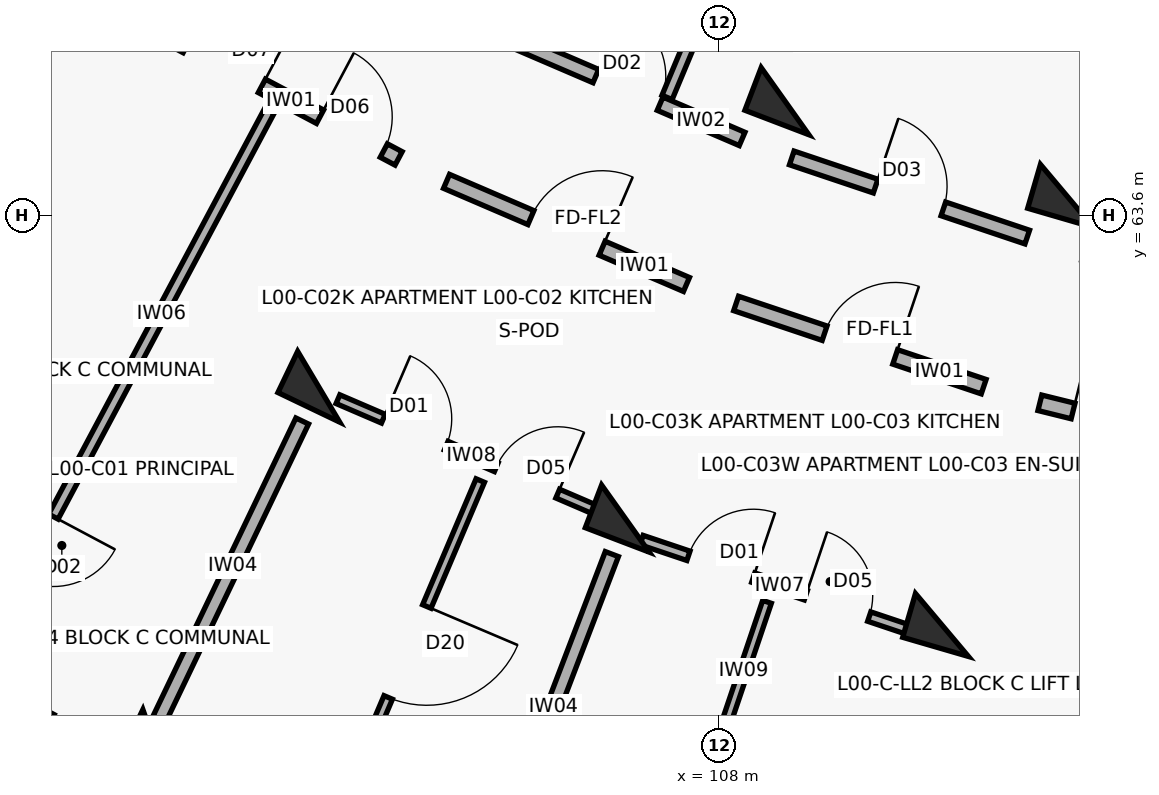
"""IFC4 building model, lengths in metres.
Left out: names, types, materials, properties, quantities, classifications, styles, units other than length and angle.
Written with IfcOpenShell. Run it as: python <this file> out.ifc"""

import sys

from ifc_helpers import new_model, si_unit, direction, frame, frame_2d, origin, origin_2d, place, context, subcontext, project, spatial, rectangle, extrude, element, fill, save


model = new_model("IFC4")
c1 = context("Model", 3, precision=1e-05, world=origin(), true_north=direction((0.0, 1.0)))
c2 = subcontext(c1, "Body", "Model", "MODEL_VIEW")
j1 = project(units=[si_unit("LENGTHUNIT", "METRE"), si_unit("PLANEANGLEUNIT", "RADIAN")], contexts=[c1])
p1 = place(None, origin())
s1 = spatial("IfcSite", under=j1, at=p1, CompositionType="ELEMENT")
p2 = place(p1, origin())
s2 = spatial("IfcBuilding", under=s1, at=p2, CompositionType="ELEMENT")
p3 = place(p2, origin())
s3 = spatial("IfcBuildingStorey", under=s2, at=p3, CompositionType="ELEMENT", Elevation=0.0)
for number, where, z_axis, x_axis in (
    (1, (98.853, 63.4, 0.0), (0.0, 0.0, 1.0), (-0.504, -0.864, 0.0)),
    (2, (102.734, 61.341, 0.0), (0.0, 0.0, 1.0), (-0.432, -0.902, 0.0)),
):
    element("IfcColumn", number, at=place(p3, frame(where, z_axis=z_axis, x_axis=x_axis)), inside=s3, PredefinedType="COLUMN", context=c2, shape_type="SweptSolid", body=[
        extrude(rectangle(XDim=0.6, YDim=0.9, at=origin_2d()), origin(), (0.0, 0.0, 1.0), 4.5),
    ])
p4 = place(p3, frame((100.539, 56.76, 0.0), z_axis=(0.0, 0.0, 1.0), x_axis=(-0.432085748802, -0.901832526405, 0.0)))
e3 = element("IfcColumn", 3, at=p4, inside=s3, PredefinedType="COLUMN", context=c2, shape_type="SweptSolid", body=[
    extrude(rectangle(XDim=0.5, YDim=0.5, at=origin_2d()), origin(), (0.0, 0.0, 1.0), 4.5),
])
for number, where, z_axis, x_axis in (
    (4, (108.869, 65.099, 0.0), (0.0, 0.0, 1.0), (-0.357, -0.934, 0.0)),
    (5, (106.77, 59.606, 0.0), (0.0, 0.0, 1.0), (-0.357, -0.934, 0.0)),
    (6, (112.579, 63.852, 0.0), (0.0, 0.0, 1.0), (-0.28, -0.96, 0.0)),
    (7, (110.934, 58.207, 0.0), (0.0, 0.0, 1.0), (-0.28, -0.96, 0.0)),
):
    element("IfcColumn", number, at=place(p3, frame(where, z_axis=z_axis, x_axis=x_axis)), inside=s3, PredefinedType="COLUMN", context=c2, shape_type="SweptSolid", body=[
        extrude(rectangle(XDim=0.6, YDim=0.9, at=origin_2d()), origin(), (0.0, 0.0, 1.0), 4.5),
    ])
p5 = place(p3, frame((96.057, 58.572, 0.0), z_axis=(0.0, 0.0, 1.0), x_axis=(0.883448093208, -0.468529045639, 0.0)))
e8 = element("IfcWall", 8, at=p5, inside=s3, PredefinedType="SOLIDWALL", context=c2, shape_type="SweptSolid", body=[
    extrude(rectangle(XDim=4.809, YDim=0.268, at=frame_2d((2.405, 0.0))), origin(), (0.0, 0.0, 1.0), 3.45),
])
p6 = place(p5, frame((0.3, 0.0, 0.3)))
e9 = element("IfcOpeningElement", 9, at=p6, cuts=e8, PredefinedType="OPENING", context=c2, shape_type="SweptSolid", body=[
    extrude(rectangle(XDim=0.96, YDim=1.42, at=frame_2d((0.48, 0.71))), frame((0.0, 0.144, 0.0), z_axis=(0.0, -1.0, 0.0), x_axis=(1.0, 0.0, 0.0)), (0.0, 0.0, 1.0), 0.288),
])
p7 = place(p5, frame((3.549, 0.0, 0.3)))
e10 = element("IfcOpeningElement", 10, at=p7, cuts=e8, PredefinedType="OPENING", context=c2, shape_type="SweptSolid", body=[
    extrude(rectangle(XDim=0.96, YDim=1.42, at=frame_2d((0.48, 0.71))), frame((0.0, 0.144, 0.0), z_axis=(0.0, -1.0, 0.0), x_axis=(1.0, 0.0, 0.0)), (0.0, 0.0, 1.0), 0.288),
])
p8 = place(p3, frame((100.75, 65.956, 0.0), z_axis=(0.0, 0.0, 1.0), x_axis=(0.883440266101, -0.468543803963, 0.0)))
e11 = element("IfcWall", 11, at=p8, inside=s3, PredefinedType="SOLIDWALL", context=c2, shape_type="SweptSolid", body=[
    extrude(rectangle(XDim=3.436, YDim=0.2, at=frame_2d((1.718, 0.0))), origin(), (0.0, 0.0, 1.0), 3.34),
])
p9 = place(p8, frame((0.28, 0.0, 0.0)))
e12 = element("IfcOpeningElement", 12, at=p9, cuts=e11, PredefinedType="OPENING", context=c2, shape_type="SweptSolid", body=[
    extrude(rectangle(XDim=1.12, YDim=2.15, at=frame_2d((0.56, 1.075))), frame((0.0, 0.11, 0.0), z_axis=(0.0, -1.0, 0.0), x_axis=(1.0, 0.0, 0.0)), (0.0, 0.0, 1.0), 0.22),
])
p10 = place(p8, frame((2.266, 0.0, 0.0)))
e13 = element("IfcOpeningElement", 13, at=p10, cuts=e11, PredefinedType="OPENING", context=c2, shape_type="SweptSolid", body=[
    extrude(rectangle(XDim=0.95, YDim=2.1, at=frame_2d((0.475, 1.05))), frame((0.0, 0.11, 0.0), z_axis=(0.0, -1.0, 0.0), x_axis=(1.0, 0.0, 0.0)), (0.0, 0.0, 1.0), 0.22),
])
p11 = place(p3, frame((102.087, 64.973, 0.0), z_axis=(0.0, 0.0, 1.0), x_axis=(-0.469878800394, -0.882730940287, 0.0)))
e14 = element("IfcWall", 14, at=p11, inside=s3, PredefinedType="PARTITIONING", context=c2, shape_type="SweptSolid", body=[
    extrude(rectangle(XDim=7.95, YDim=0.14, at=frame_2d((3.975, 0.0))), origin(), (0.0, 0.0, 1.0), 3.34),
])
p12 = place(p11, frame((6.05, 0.0, 0.0)))
e15 = element("IfcOpeningElement", 15, at=p12, cuts=e14, PredefinedType="OPENING", context=c2, shape_type="SweptSolid", body=[
    extrude(rectangle(XDim=0.92, YDim=2.1, at=frame_2d((0.46, 1.05))), frame((0.0, 0.08, 0.0), z_axis=(0.0, -1.0, 0.0), x_axis=(1.0, 0.0, 0.0)), (0.0, 0.0, 1.0), 0.16),
])
p13 = place(p3, frame((104.417, 64.044, 0.0), z_axis=(0.0, 0.0, 1.0), x_axis=(0.918718172399, -0.394913813008, 0.0)))
e16 = element("IfcWall", 16, at=p13, inside=s3, PredefinedType="SOLIDWALL", context=c2, shape_type="SweptSolid", body=[
    extrude(rectangle(XDim=3.436, YDim=0.2, at=frame_2d((1.718, 0.0))), origin(), (0.0, 0.0, 1.0), 3.34),
])
p14 = place(p13, frame((1.208, 0.0, 0.0)))
e17 = element("IfcOpeningElement", 17, at=p14, cuts=e16, PredefinedType="OPENING", context=c2, shape_type="SweptSolid", body=[
    extrude(rectangle(XDim=1.02, YDim=2.15, at=frame_2d((0.51, 1.075))), frame((0.0, 0.11, 0.0), z_axis=(0.0, -1.0, 0.0), x_axis=(1.0, 0.0, 0.0)), (0.0, 0.0, 1.0), 0.22),
])
p15 = place(p3, frame((105.302, 65.893, 0.0), z_axis=(0.0, 0.0, 1.0), x_axis=(0.918723391052, -0.394901672235, 0.0)))
e18 = element("IfcWall", 18, at=p15, inside=s3, PredefinedType="SOLIDWALL", context=c2, shape_type="SweptSolid", body=[
    extrude(rectangle(XDim=3.269, YDim=0.19, at=frame_2d((1.634, 0.0))), origin(), (0.0, 0.0, 1.0), 3.34),
])
p16 = place(p15, frame((1.174, 0.0, 0.0)))
e19 = element("IfcOpeningElement", 19, at=p16, cuts=e18, PredefinedType="OPENING", context=c2, shape_type="SweptSolid", body=[
    extrude(rectangle(XDim=0.92, YDim=2.1, at=frame_2d((0.46, 1.05))), frame((0.0, 0.105, 0.0), z_axis=(0.0, -1.0, 0.0), x_axis=(1.0, 0.0, 0.0)), (0.0, 0.0, 1.0), 0.21),
])
p17 = place(p3, frame((108.589, 68.194, 0.0), z_axis=(0.0, 0.0, 1.0), x_axis=(-0.385151143297, -0.922853507777, 0.0)))
e20 = element("IfcWall", 20, at=p17, inside=s3, PredefinedType="PARTITIONING", context=c2, shape_type="SweptSolid", body=[
    extrude(rectangle(XDim=3.3, YDim=0.145, at=frame_2d((1.65, 0.0))), origin(), (0.0, 0.0, 1.0), 3.34),
])
p18 = place(p17, frame((1.21, 0.0, 0.0)))
e21 = element("IfcOpeningElement", 21, at=p18, cuts=e20, PredefinedType="OPENING", context=c2, shape_type="SweptSolid", body=[
    extrude(rectangle(XDim=0.88, YDim=2.1, at=frame_2d((0.44, 1.05))), frame((0.0, 0.083, 0.0), z_axis=(0.0, -1.0, 0.0), x_axis=(1.0, 0.0, 0.0)), (0.0, 0.0, 1.0), 0.165),
])
p19 = place(p3, frame((102.988, 61.178, 0.0), z_axis=(0.0, 0.0, 1.0), x_axis=(0.918732171064, -0.394881245253, 0.0)))
e22 = element("IfcWall", 22, at=p19, inside=s3, PredefinedType="PARTITIONING", context=c2, shape_type="SweptSolid", body=[
    extrude(rectangle(XDim=3.797, YDim=0.125, at=frame_2d((1.899, 0.0))), origin(), (0.0, 0.0, 1.0), 3.34),
])
p20 = place(p19, frame((0.65, 0.0, 0.0)))
e23 = element("IfcOpeningElement", 23, at=p20, cuts=e22, PredefinedType="OPENING", context=c2, shape_type="SweptSolid", body=[
    extrude(rectangle(XDim=0.9, YDim=2.1, at=frame_2d((0.45, 1.05))), frame((0.0, 0.073, 0.0), z_axis=(0.0, -1.0, 0.0), x_axis=(1.0, 0.0, 0.0)), (0.0, 0.0, 1.0), 0.145),
])
p21 = place(p19, frame((2.267, 0.0, 0.0)))
e24 = element("IfcOpeningElement", 24, at=p21, cuts=e22, PredefinedType="OPENING", context=c2, shape_type="SweptSolid", body=[
    extrude(rectangle(XDim=0.88, YDim=2.1, at=frame_2d((0.44, 1.05))), frame((0.0, 0.073, 0.0), z_axis=(0.0, -1.0, 0.0), x_axis=(1.0, 0.0, 0.0)), (0.0, 0.0, 1.0), 0.145),
])
p22 = place(p3, frame((104.86, 60.107, 0.0), z_axis=(0.0, 0.0, 1.0), x_axis=(-0.390783996242, -0.920482410631, 0.0)))
e25 = element("IfcWall", 25, at=p22, inside=s3, PredefinedType="PARTITIONING", context=c2, shape_type="SweptSolid", body=[
    extrude(rectangle(XDim=4.9, YDim=0.12, at=frame_2d((2.45, 0.0))), origin(), (0.0, 0.0, 1.0), 3.34),
])
p23 = place(p22, frame((1.8, 0.0, 0.0)))
e26 = element("IfcOpeningElement", 26, at=p23, cuts=e25, PredefinedType="OPENING", context=c2, shape_type="SweptSolid", body=[
    extrude(rectangle(XDim=1.3, YDim=2.1, at=frame_2d((0.65, 1.05))), frame((0.0, 0.07, 0.0), z_axis=(0.0, -1.0, 0.0), x_axis=(1.0, 0.0, 0.0)), (0.0, 0.0, 1.0), 0.14),
])
p24 = place(p3, frame((102.518, 60.89, 0.0), z_axis=(0.0, 0.0, 1.0), x_axis=(-0.432108769108, -0.901821496561, 0.0)))
e27 = element("IfcWall", 27, at=p24, inside=s3, PredefinedType="SOLIDWALL", context=c2, shape_type="SweptSolid", body=[
    extrude(rectangle(XDim=4.35, YDim=0.185, at=frame_2d((2.175, 0.0))), origin(), (0.0, 0.0, 1.0), 3.34),
])
p25 = place(p3, frame((108.227, 62.437, 0.0), z_axis=(0.0, 0.0, 1.0), x_axis=(0.947884468821, -0.318614239745, 0.0)))
e28 = element("IfcWall", 28, at=p25, inside=s3, PredefinedType="SOLIDWALL", context=c2, shape_type="SweptSolid", body=[
    extrude(rectangle(XDim=3.436, YDim=0.2, at=frame_2d((1.718, 0.0))), origin(), (0.0, 0.0, 1.0), 3.34),
])
p26 = place(p25, frame((1.228, 0.0, 0.0)))
e29 = element("IfcOpeningElement", 29, at=p26, cuts=e28, PredefinedType="OPENING", context=c2, shape_type="SweptSolid", body=[
    extrude(rectangle(XDim=0.98, YDim=2.15, at=frame_2d((0.49, 1.075))), frame((0.0, 0.11, 0.0), z_axis=(0.0, -1.0, 0.0), x_axis=(1.0, 0.0, 0.0)), (0.0, 0.0, 1.0), 0.22),
])
p27 = place(p3, frame((108.958, 64.352, 0.0), z_axis=(0.0, 0.0, 1.0), x_axis=(0.94787351033, -0.318646839643, 0.0)))
e30 = element("IfcWall", 30, at=p27, inside=s3, PredefinedType="SOLIDWALL", context=c2, shape_type="SweptSolid", body=[
    extrude(rectangle(XDim=3.269, YDim=0.19, at=frame_2d((1.634, 0.0))), origin(), (0.0, 0.0, 1.0), 3.34),
])
p28 = place(p27, frame((1.164, 0.0, 0.0)))
e31 = element("IfcOpeningElement", 31, at=p28, cuts=e30, PredefinedType="OPENING", context=c2, shape_type="SweptSolid", body=[
    extrude(rectangle(XDim=0.94, YDim=2.1, at=frame_2d((0.47, 1.05))), frame((0.0, 0.105, 0.0), z_axis=(0.0, -1.0, 0.0), x_axis=(1.0, 0.0, 0.0)), (0.0, 0.0, 1.0), 0.21),
])
p29 = place(p3, frame((106.983, 59.324, 0.0), z_axis=(0.0, 0.0, 1.0), x_axis=(0.947879193428, -0.318629933725, 0.0)))
e32 = element("IfcWall", 32, at=p29, inside=s3, PredefinedType="PARTITIONING", context=c2, shape_type="SweptSolid", body=[
    extrude(rectangle(XDim=3.81, YDim=0.13, at=frame_2d((1.905, 0.0))), origin(), (0.0, 0.0, 1.0), 3.34),
])
p30 = place(p29, frame((0.65, 0.0, 0.0)))
e33 = element("IfcOpeningElement", 33, at=p30, cuts=e32, PredefinedType="OPENING", context=c2, shape_type="SweptSolid", body=[
    extrude(rectangle(XDim=0.9, YDim=2.1, at=frame_2d((0.45, 1.05))), frame((0.0, 0.075, 0.0), z_axis=(0.0, -1.0, 0.0), x_axis=(1.0, 0.0, 0.0)), (0.0, 0.0, 1.0), 0.15),
])
p31 = place(p29, frame((2.28, 0.0, 0.0)))
e34 = element("IfcOpeningElement", 34, at=p31, cuts=e32, PredefinedType="OPENING", context=c2, shape_type="SweptSolid", body=[
    extrude(rectangle(XDim=0.88, YDim=2.1, at=frame_2d((0.44, 1.05))), frame((0.0, 0.075, 0.0), z_axis=(0.0, -1.0, 0.0), x_axis=(1.0, 0.0, 0.0)), (0.0, 0.0, 1.0), 0.15),
])
p32 = place(p3, frame((108.633, 58.511, 0.0), z_axis=(0.0, 0.0, 1.0), x_axis=(-0.320064719126, -0.947395680574, 0.0)))
e35 = element("IfcWall", 35, at=p32, inside=s3, PredefinedType="PARTITIONING", context=c2, shape_type="SweptSolid", body=[
    extrude(rectangle(XDim=4.75, YDim=0.12, at=frame_2d((2.375, 0.0))), origin(), (0.0, 0.0, 1.0), 3.34),
])
p33 = place(p32, frame((1.925, 0.0, 0.0)))
e36 = element("IfcOpeningElement", 36, at=p33, cuts=e35, PredefinedType="OPENING", context=c2, shape_type="SweptSolid", body=[
    extrude(rectangle(XDim=0.9, YDim=2.1, at=frame_2d((0.45, 1.05))), frame((0.0, 0.07, 0.0), z_axis=(0.0, -1.0, 0.0), x_axis=(1.0, 0.0, 0.0)), (0.0, 0.0, 1.0), 0.14),
])
p34 = place(p3, frame((106.591, 59.139, 0.0), z_axis=(0.0, 0.0, 1.0), x_axis=(-0.357064016205, -0.934079915388, 0.0)))
e37 = element("IfcWall", 37, at=p34, inside=s3, PredefinedType="SOLIDWALL", context=c2, shape_type="SweptSolid", body=[
    extrude(rectangle(XDim=4.35, YDim=0.185, at=frame_2d((2.175, 0.0))), origin(), (0.0, 0.0, 1.0), 3.34),
])
p35 = place(p3, frame((112.223, 61.13, 0.0), z_axis=(0.0, 0.0, 1.0), x_axis=(0.970719238682, -0.240216901263, 0.0)))
e38 = element("IfcWall", 38, at=p35, inside=s3, PredefinedType="SOLIDWALL", context=c2, shape_type="SweptSolid", body=[
    extrude(rectangle(XDim=3.296, YDim=0.21, at=frame_2d((1.648, 0.0))), origin(), (0.0, 0.0, 1.0), 3.34),
])
p36 = place(p35, frame((0.45, 0.0, 0.0)))
e39 = element("IfcOpeningElement", 39, at=p36, cuts=e38, PredefinedType="OPENING", context=c2, shape_type="SweptSolid", body=[
    extrude(rectangle(XDim=1.1, YDim=2.15, at=frame_2d((0.55, 1.075))), frame((0.0, 0.115, 0.0), z_axis=(0.0, -1.0, 0.0), x_axis=(1.0, 0.0, 0.0)), (0.0, 0.0, 1.0), 0.23),
])
p37 = place(p35, frame((1.726, 0.0, 0.0)))
e40 = element("IfcOpeningElement", 40, at=p37, cuts=e38, PredefinedType="OPENING", context=c2, shape_type="SweptSolid", body=[
    extrude(rectangle(XDim=1.12, YDim=2.15, at=frame_2d((0.56, 1.075))), frame((0.0, 0.115, 0.0), z_axis=(0.0, -1.0, 0.0), x_axis=(1.0, 0.0, 0.0)), (0.0, 0.0, 1.0), 0.23),
])
p38 = place(p9, origin())
e41 = element("IfcDoor", 41, at=p38, inside=s3, OperationType="SINGLE_SWING_RIGHT", PredefinedType="DOOR", context=c2, shape_type="SweptSolid", body=[
    extrude(rectangle(XDim=1.12, YDim=2.15, at=frame_2d((0.56, 1.075))), frame((0.0, 0.025, 0.0), z_axis=(0.0, -1.0, 0.0), x_axis=(1.0, 0.0, 0.0)), (0.0, 0.0, 1.0), 0.05),
])
fill(e12, e41)
p39 = place(p10, origin())
e42 = element("IfcDoor", 42, at=p39, inside=s3, OperationType="SINGLE_SWING_LEFT", PredefinedType="DOOR", context=c2, shape_type="SweptSolid", body=[
    extrude(rectangle(XDim=0.95, YDim=2.1, at=frame_2d((0.475, 1.05))), frame((0.0, 0.025, 0.0), z_axis=(0.0, -1.0, 0.0), x_axis=(1.0, 0.0, 0.0)), (0.0, 0.0, 1.0), 0.05),
])
fill(e13, e42)
p40 = place(p12, origin())
e43 = element("IfcDoor", 43, at=p40, inside=s3, OperationType="SINGLE_SWING_LEFT", PredefinedType="DOOR", context=c2, shape_type="SweptSolid", body=[
    extrude(rectangle(XDim=0.92, YDim=2.1, at=frame_2d((0.46, 1.05))), frame((0.0, 0.025, 0.0), z_axis=(0.0, -1.0, 0.0), x_axis=(1.0, 0.0, 0.0)), (0.0, 0.0, 1.0), 0.05),
])
fill(e15, e43)
p41 = place(p14, origin())
e44 = element("IfcDoor", 44, at=p41, inside=s3, OperationType="SINGLE_SWING_RIGHT", PredefinedType="DOOR", context=c2, shape_type="SweptSolid", body=[
    extrude(rectangle(XDim=1.02, YDim=2.15, at=frame_2d((0.51, 1.075))), frame((0.0, 0.025, 0.0), z_axis=(0.0, -1.0, 0.0), x_axis=(1.0, 0.0, 0.0)), (0.0, 0.0, 1.0), 0.05),
])
fill(e17, e44)
p42 = place(p16, origin())
e45 = element("IfcDoor", 45, at=p42, inside=s3, OperationType="SINGLE_SWING_LEFT", PredefinedType="DOOR", context=c2, shape_type="SweptSolid", body=[
    extrude(rectangle(XDim=0.92, YDim=2.1, at=frame_2d((0.46, 1.05))), frame((0.0, 0.025, 0.0), z_axis=(0.0, -1.0, 0.0), x_axis=(1.0, 0.0, 0.0)), (0.0, 0.0, 1.0), 0.05),
])
fill(e19, e45)
p43 = place(p20, origin())
e46 = element("IfcDoor", 46, at=p43, inside=s3, OperationType="SINGLE_SWING_LEFT", PredefinedType="DOOR", context=c2, shape_type="SweptSolid", body=[
    extrude(rectangle(XDim=0.9, YDim=2.1, at=frame_2d((0.45, 1.05))), frame((0.0, 0.025, 0.0), z_axis=(0.0, -1.0, 0.0), x_axis=(1.0, 0.0, 0.0)), (0.0, 0.0, 1.0), 0.05),
])
fill(e23, e46)
p44 = place(p21, origin())
e47 = element("IfcDoor", 47, at=p44, inside=s3, OperationType="SINGLE_SWING_RIGHT", PredefinedType="DOOR", context=c2, shape_type="SweptSolid", body=[
    extrude(rectangle(XDim=0.88, YDim=2.1, at=frame_2d((0.44, 1.05))), frame((0.0, 0.025, 0.0), z_axis=(0.0, -1.0, 0.0), x_axis=(1.0, 0.0, 0.0)), (0.0, 0.0, 1.0), 0.05),
])
fill(e24, e47)
p45 = place(p23, origin())
e48 = element("IfcDoor", 48, at=p45, inside=s3, OperationType="SINGLE_SWING_LEFT", PredefinedType="DOOR", context=c2, shape_type="SweptSolid", body=[
    extrude(rectangle(XDim=1.3, YDim=2.1, at=frame_2d((0.65, 1.05))), frame((0.0, 0.025, 0.0), z_axis=(0.0, -1.0, 0.0), x_axis=(1.0, 0.0, 0.0)), (0.0, 0.0, 1.0), 0.05),
])
fill(e26, e48)
p46 = place(p26, origin())
e49 = element("IfcDoor", 49, at=p46, inside=s3, OperationType="SINGLE_SWING_RIGHT", PredefinedType="DOOR", context=c2, shape_type="SweptSolid", body=[
    extrude(rectangle(XDim=0.98, YDim=2.15, at=frame_2d((0.49, 1.075))), frame((0.0, 0.025, 0.0), z_axis=(0.0, -1.0, 0.0), x_axis=(1.0, 0.0, 0.0)), (0.0, 0.0, 1.0), 0.05),
])
fill(e29, e49)
p47 = place(p28, origin())
e50 = element("IfcDoor", 50, at=p47, inside=s3, OperationType="SINGLE_SWING_LEFT", PredefinedType="DOOR", context=c2, shape_type="SweptSolid", body=[
    extrude(rectangle(XDim=0.94, YDim=2.1, at=frame_2d((0.47, 1.05))), frame((0.0, 0.025, 0.0), z_axis=(0.0, -1.0, 0.0), x_axis=(1.0, 0.0, 0.0)), (0.0, 0.0, 1.0), 0.05),
])
fill(e31, e50)
p48 = place(p30, origin())
e51 = element("IfcDoor", 51, at=p48, inside=s3, OperationType="SINGLE_SWING_RIGHT", PredefinedType="DOOR", context=c2, shape_type="SweptSolid", body=[
    extrude(rectangle(XDim=0.9, YDim=2.1, at=frame_2d((0.45, 1.05))), frame((0.0, 0.025, 0.0), z_axis=(0.0, -1.0, 0.0), x_axis=(1.0, 0.0, 0.0)), (0.0, 0.0, 1.0), 0.05),
])
fill(e33, e51)
p49 = place(p31, origin())
e52 = element("IfcDoor", 52, at=p49, inside=s3, OperationType="SINGLE_SWING_LEFT", PredefinedType="DOOR", context=c2, shape_type="SweptSolid", body=[
    extrude(rectangle(XDim=0.88, YDim=2.1, at=frame_2d((0.44, 1.05))), frame((0.0, 0.025, 0.0), z_axis=(0.0, -1.0, 0.0), x_axis=(1.0, 0.0, 0.0)), (0.0, 0.0, 1.0), 0.05),
])
fill(e34, e52)
p50 = place(p36, origin())
e53 = element("IfcDoor", 53, at=p50, inside=s3, OperationType="SINGLE_SWING_LEFT", PredefinedType="DOOR", context=c2, shape_type="SweptSolid", body=[
    extrude(rectangle(XDim=1.1, YDim=2.15, at=frame_2d((0.55, 1.075))), frame((0.0, 0.025, 0.0), z_axis=(0.0, -1.0, 0.0), x_axis=(1.0, 0.0, 0.0)), (0.0, 0.0, 1.0), 0.05),
])
fill(e39, e53)
save(model, sys.argv[1])
